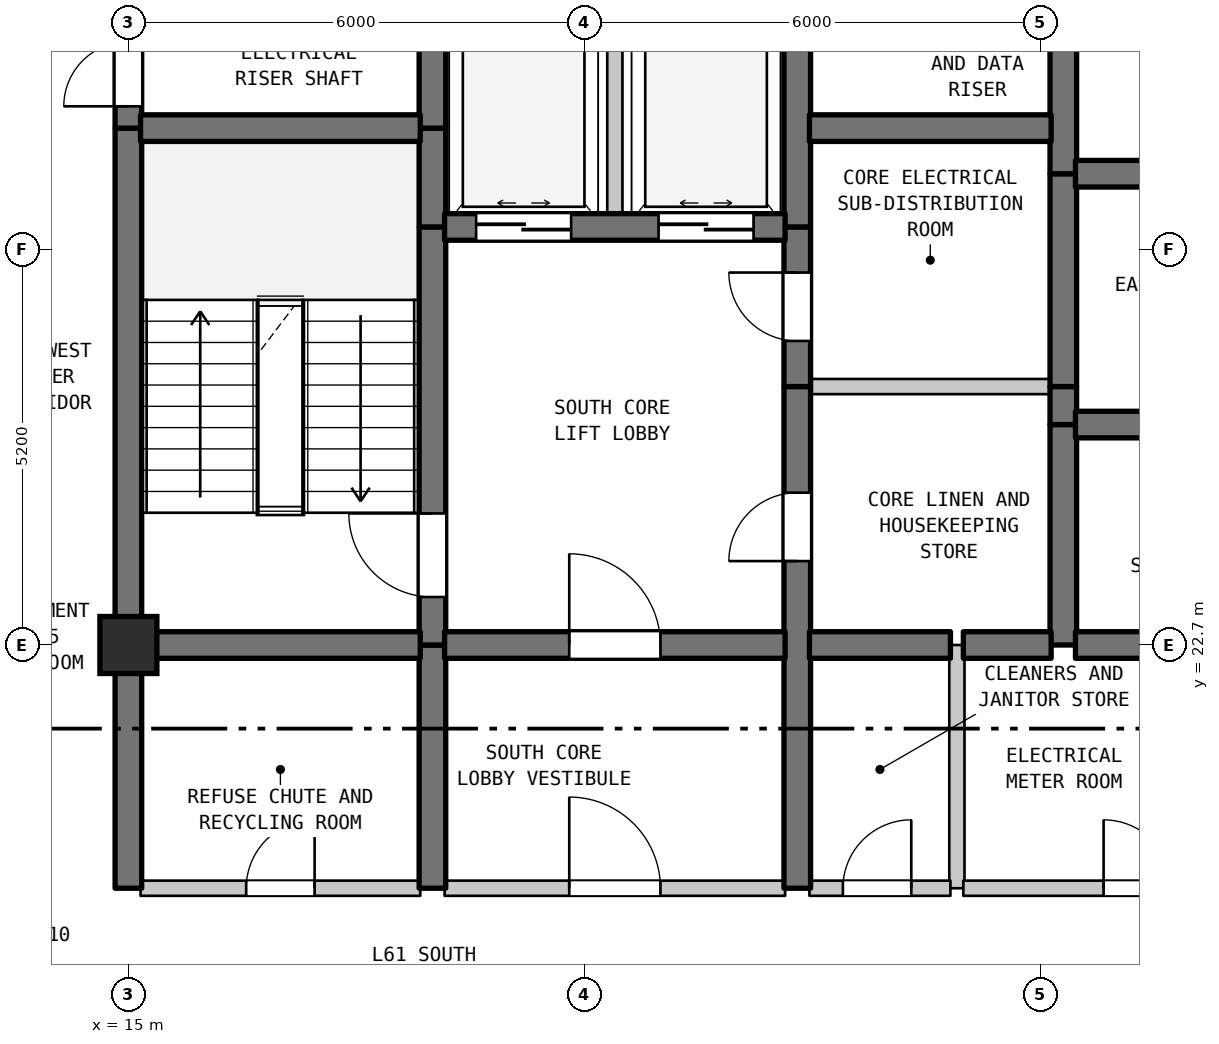
"""IFC4 building model, lengths in metres.
Left out: names, types, materials, properties, quantities, classifications, styles, units other than length and angle.
Written with IfcOpenShell. Run it as: python <this file> out.ifc"""

import sys

from ifc_helpers import new_model, si_unit, direction, frame, frame_2d, origin, origin_2d, place, context, subcontext, project, spatial, rectangle, extrude, element, fill, save


model = new_model("IFC4")
c1 = context("Model", 3, precision=1e-05, world=origin(), true_north=direction((0.0, 1.0)))
c2 = subcontext(c1, "Body", "Model", "MODEL_VIEW")
j1 = project(units=[si_unit("LENGTHUNIT", "METRE"), si_unit("PLANEANGLEUNIT", "RADIAN")], contexts=[c1])
p1 = place(None, origin())
s1 = spatial("IfcSite", under=j1, at=p1, CompositionType="ELEMENT")
p2 = place(p1, origin())
s2 = spatial("IfcBuilding", under=s1, at=p2, CompositionType="ELEMENT")
p3 = place(p2, frame((0.0, 0.0, 247.3)))
s3 = spatial("IfcBuildingStorey", under=s2, at=p3, CompositionType="ELEMENT", Elevation=247.3)
p4 = place(p3, frame((15.0, 22.7, 0.0), z_axis=(0.0, 0.0, 1.0), x_axis=(1.0, 0.0, 0.0)))
e1 = element("IfcColumn", 1, at=p4, inside=s3, PredefinedType="COLUMN", context=c2, shape_type="SweptSolid", body=[
    extrude(rectangle(XDim=0.75, YDim=0.75, at=origin_2d()), origin(), (0.0, 0.0, 1.0), 3.7),
])
p5 = place(p3, frame((15.0, 19.5, 0.0), z_axis=(0.0, 0.0, 1.0), x_axis=(0.0, 1.0, 0.0)))
e2 = element("IfcWall", 2, at=p5, inside=s3, PredefinedType="SHEAR", context=c2, shape_type="SweptSolid", body=[
    extrude(rectangle(XDim=3.2, YDim=0.35, at=frame_2d((1.6, 0.0))), origin(), (0.0, 0.0, 1.0), 3.39),
])
p6 = place(p3, frame((15.0, 22.7, 0.0), z_axis=(0.0, 0.0, 1.0), x_axis=(0.0, 1.0, 0.0)))
e3 = element("IfcWall", 3, at=p6, inside=s3, PredefinedType="SHEAR", context=c2, shape_type="SweptSolid", body=[
    extrude(rectangle(XDim=6.8, YDim=0.35, at=frame_2d((3.4, 0.0))), origin(), (0.0, 0.0, 1.0), 3.39),
])
p7 = place(p3, frame((15.0, 29.5, 0.0), z_axis=(0.0, 0.0, 1.0), x_axis=(0.0, 1.0, 0.0)))
e4 = element("IfcWall", 4, at=p7, inside=s3, PredefinedType="SHEAR", context=c2, shape_type="SweptSolid", body=[
    extrude(rectangle(XDim=1.6, YDim=0.35, at=frame_2d((0.8, 0.0))), origin(), (0.0, 0.0, 1.0), 3.39),
])
p8 = place(p7, frame((0.287, 0.0, 0.0)))
e5 = element("IfcOpeningElement", 5, at=p8, cuts=e4, PredefinedType="OPENING", context=c2, shape_type="SweptSolid", body=[
    extrude(rectangle(XDim=0.85, YDim=2.1, at=frame_2d((0.425, 1.05))), frame((0.0, 0.185, 0.0), z_axis=(0.0, -1.0, 0.0), x_axis=(1.0, 0.0, 0.0)), (0.0, 0.0, 1.0), 0.37),
])
p9 = place(p3, frame((19.0, 19.5, 0.0), z_axis=(0.0, 0.0, 1.0), x_axis=(0.0, 1.0, 0.0)))
e6 = element("IfcWall", 6, at=p9, inside=s3, PredefinedType="SHEAR", context=c2, shape_type="SweptSolid", body=[
    extrude(rectangle(XDim=3.2, YDim=0.35, at=frame_2d((1.6, 0.0))), origin(), (0.0, 0.0, 1.0), 3.39),
])
p10 = place(p3, frame((19.0, 22.7, 0.0), z_axis=(0.0, 0.0, 1.0), x_axis=(0.0, 1.0, 0.0)))
e7 = element("IfcWall", 7, at=p10, inside=s3, PredefinedType="SHEAR", context=c2, shape_type="SweptSolid", body=[
    extrude(rectangle(XDim=5.5, YDim=0.35, at=frame_2d((2.75, 0.0))), origin(), (0.0, 0.0, 1.0), 3.39),
])
p11 = place(p10, frame((0.631, 0.0, 0.0)))
e8 = element("IfcOpeningElement", 8, at=p11, cuts=e7, PredefinedType="OPENING", context=c2, shape_type="SweptSolid", body=[
    extrude(rectangle(XDim=1.1, YDim=2.15, at=frame_2d((0.55, 1.075))), frame((0.0, 0.185, 0.0), z_axis=(0.0, -1.0, 0.0), x_axis=(1.0, 0.0, 0.0)), (0.0, 0.0, 1.0), 0.37),
])
p12 = place(p3, frame((19.0, 28.2, 0.0), z_axis=(0.0, 0.0, 1.0), x_axis=(0.0, 1.0, 0.0)))
e9 = element("IfcWall", 9, at=p12, inside=s3, PredefinedType="SHEAR", context=c2, shape_type="SweptSolid", body=[
    extrude(rectangle(XDim=1.3, YDim=0.35, at=frame_2d((0.65, 0.0))), origin(), (0.0, 0.0, 1.0), 3.39),
])
p13 = place(p3, frame((19.0, 29.5, 0.0), z_axis=(0.0, 0.0, 1.0), x_axis=(0.0, 1.0, 0.0)))
e10 = element("IfcWall", 10, at=p13, inside=s3, PredefinedType="SHEAR", context=c2, shape_type="SweptSolid", body=[
    extrude(rectangle(XDim=5.5, YDim=0.35, at=frame_2d((2.75, 0.0))), origin(), (0.0, 0.0, 1.0), 3.39),
])
p14 = place(p13, frame((2.025, 0.0, 0.0)))
e11 = element("IfcOpeningElement", 11, at=p14, cuts=e10, PredefinedType="OPENING", context=c2, shape_type="SweptSolid", body=[
    extrude(rectangle(XDim=1.1, YDim=2.15, at=frame_2d((0.55, 1.075))), frame((0.0, 0.185, 0.0), z_axis=(0.0, -1.0, 0.0), x_axis=(1.0, 0.0, 0.0)), (0.0, 0.0, 1.0), 0.37),
])
p15 = place(p3, frame((21.4, 28.2, 0.0), z_axis=(0.0, 0.0, 1.0), x_axis=(0.0, 1.0, 0.0)))
e12 = element("IfcWall", 12, at=p15, inside=s3, PredefinedType="STANDARD", context=c2, shape_type="SweptSolid", body=[
    extrude(rectangle(XDim=2.6, YDim=0.2, at=frame_2d((1.3, 0.0))), origin(), (0.0, 0.0, 1.0), 3.39),
])
p16 = place(p3, frame((23.8, 19.5, 0.0), z_axis=(0.0, 0.0, 1.0), x_axis=(0.0, 1.0, 0.0)))
e13 = element("IfcWall", 13, at=p16, inside=s3, PredefinedType="SHEAR", context=c2, shape_type="SweptSolid", body=[
    extrude(rectangle(XDim=6.6, YDim=0.35, at=frame_2d((3.3, 0.0))), origin(), (0.0, 0.0, 1.0), 3.39),
])
p17 = place(p16, frame((4.304, 0.0, 0.0)))
e14 = element("IfcOpeningElement", 14, at=p17, cuts=e13, PredefinedType="OPENING", context=c2, shape_type="SweptSolid", body=[
    extrude(rectangle(XDim=0.9, YDim=2.15, at=frame_2d((0.45, 1.075))), frame((0.0, 0.185, 0.0), z_axis=(0.0, -1.0, 0.0), x_axis=(1.0, 0.0, 0.0)), (0.0, 0.0, 1.0), 0.37),
])
p18 = place(p3, frame((23.8, 26.1, 0.0), z_axis=(0.0, 0.0, 1.0), x_axis=(0.0, 1.0, 0.0)))
e15 = element("IfcWall", 15, at=p18, inside=s3, PredefinedType="SHEAR", context=c2, shape_type="SweptSolid", body=[
    extrude(rectangle(XDim=2.1, YDim=0.35, at=frame_2d((1.05, 0.0))), origin(), (0.0, 0.0, 1.0), 3.39),
])
p19 = place(p18, frame((0.6, 0.0, 0.0)))
e16 = element("IfcOpeningElement", 16, at=p19, cuts=e15, PredefinedType="OPENING", context=c2, shape_type="SweptSolid", body=[
    extrude(rectangle(XDim=0.9, YDim=2.15, at=frame_2d((0.45, 1.075))), frame((0.0, 0.185, 0.0), z_axis=(0.0, -1.0, 0.0), x_axis=(1.0, 0.0, 0.0)), (0.0, 0.0, 1.0), 0.37),
])
p20 = place(p3, frame((23.8, 28.2, 0.0), z_axis=(0.0, 0.0, 1.0), x_axis=(0.0, 1.0, 0.0)))
e17 = element("IfcWall", 17, at=p20, inside=s3, PredefinedType="SHEAR", context=c2, shape_type="SweptSolid", body=[
    extrude(rectangle(XDim=2.6, YDim=0.35, at=frame_2d((1.3, 0.0))), origin(), (0.0, 0.0, 1.0), 3.39),
])
p21 = place(p3, frame((25.9, 19.5, 0.0), z_axis=(0.0, 0.0, 1.0), x_axis=(0.0, 1.0, 0.0)))
e18 = element("IfcWall", 18, at=p21, inside=s3, PredefinedType="STANDARD", context=c2, shape_type="SweptSolid", body=[
    extrude(rectangle(XDim=3.2, YDim=0.2, at=frame_2d((1.6, 0.0))), origin(), (0.0, 0.0, 1.0), 3.39),
])
p22 = place(p3, frame((27.3, 22.7, 0.0), z_axis=(0.0, 0.0, 1.0), x_axis=(0.0, 1.0, 0.0)))
e19 = element("IfcWall", 19, at=p22, inside=s3, PredefinedType="SHEAR", context=c2, shape_type="SweptSolid", body=[
    extrude(rectangle(XDim=2.9, YDim=0.35, at=frame_2d((1.45, 0.0))), origin(), (0.0, 0.0, 1.0), 3.39),
])
p23 = place(p3, frame((27.3, 25.6, 0.0), z_axis=(0.0, 0.0, 1.0), x_axis=(0.0, 1.0, 0.0)))
e20 = element("IfcWall", 20, at=p23, inside=s3, PredefinedType="SHEAR", context=c2, shape_type="SweptSolid", body=[
    extrude(rectangle(XDim=0.5, YDim=0.35, at=frame_2d((0.25, 0.0))), origin(), (0.0, 0.0, 1.0), 3.39),
])
p24 = place(p3, frame((27.3, 26.1, 0.0), z_axis=(0.0, 0.0, 1.0), x_axis=(0.0, 1.0, 0.0)))
e21 = element("IfcWall", 21, at=p24, inside=s3, PredefinedType="SHEAR", context=c2, shape_type="SweptSolid", body=[
    extrude(rectangle(XDim=2.8, YDim=0.35, at=frame_2d((1.4, 0.0))), origin(), (0.0, 0.0, 1.0), 3.39),
])
p25 = place(p3, frame((27.3, 28.9, 0.0), z_axis=(0.0, 0.0, 1.0), x_axis=(0.0, 1.0, 0.0)))
e22 = element("IfcWall", 22, at=p25, inside=s3, PredefinedType="SHEAR", context=c2, shape_type="SweptSolid", body=[
    extrude(rectangle(XDim=2.6, YDim=0.35, at=frame_2d((1.3, 0.0))), origin(), (0.0, 0.0, 1.0), 3.39),
])
p26 = place(p3, frame((15.16, 19.5, 0.0), z_axis=(0.0, 0.0, 1.0), x_axis=(1.0, 0.0, 0.0)))
e23 = element("IfcWall", 23, at=p26, inside=s3, PredefinedType="STANDARD", context=c2, shape_type="SweptSolid", body=[
    extrude(rectangle(XDim=3.68, YDim=0.2, at=frame_2d((1.84, 0.0))), origin(), (0.0, 0.0, 1.0), 3.39),
])
p27 = place(p26, frame((1.39, 0.0, 0.0)))
e24 = element("IfcOpeningElement", 24, at=p27, cuts=e23, PredefinedType="OPENING", context=c2, shape_type="SweptSolid", body=[
    extrude(rectangle(XDim=0.9, YDim=2.15, at=frame_2d((0.45, 1.075))), frame((0.0, 0.11, 0.0), z_axis=(0.0, -1.0, 0.0), x_axis=(1.0, 0.0, 0.0)), (0.0, 0.0, 1.0), 0.22),
])
p28 = place(p3, frame((19.16, 19.5, 0.0), z_axis=(0.0, 0.0, 1.0), x_axis=(1.0, 0.0, 0.0)))
e25 = element("IfcWall", 25, at=p28, inside=s3, PredefinedType="STANDARD", context=c2, shape_type="SweptSolid", body=[
    extrude(rectangle(XDim=4.48, YDim=0.2, at=frame_2d((2.24, 0.0))), origin(), (0.0, 0.0, 1.0), 3.39),
])
p29 = place(p28, frame((1.64, 0.0, 0.0)))
e26 = element("IfcOpeningElement", 26, at=p29, cuts=e25, PredefinedType="OPENING", context=c2, shape_type="SweptSolid", body=[
    extrude(rectangle(XDim=1.2, YDim=2.2, at=frame_2d((0.6, 1.1))), frame((0.0, 0.11, 0.0), z_axis=(0.0, -1.0, 0.0), x_axis=(1.0, 0.0, 0.0)), (0.0, 0.0, 1.0), 0.22),
])
p30 = place(p3, frame((23.96, 19.5, 0.0), z_axis=(0.0, 0.0, 1.0), x_axis=(1.0, 0.0, 0.0)))
e27 = element("IfcWall", 27, at=p30, inside=s3, PredefinedType="STANDARD", context=c2, shape_type="SweptSolid", body=[
    extrude(rectangle(XDim=1.855, YDim=0.2, at=frame_2d((0.927, 0.0))), origin(), (0.0, 0.0, 1.0), 3.39),
])
p31 = place(p30, frame((0.44, 0.0, 0.0)))
e28 = element("IfcOpeningElement", 28, at=p31, cuts=e27, PredefinedType="OPENING", context=c2, shape_type="SweptSolid", body=[
    extrude(rectangle(XDim=0.9, YDim=2.15, at=frame_2d((0.45, 1.075))), frame((0.0, 0.11, 0.0), z_axis=(0.0, -1.0, 0.0), x_axis=(1.0, 0.0, 0.0)), (0.0, 0.0, 1.0), 0.22),
])
p32 = place(p3, frame((25.985, 19.5, 0.0), z_axis=(0.0, 0.0, 1.0), x_axis=(1.0, 0.0, 0.0)))
e29 = element("IfcWall", 29, at=p32, inside=s3, PredefinedType="STANDARD", context=c2, shape_type="SweptSolid", body=[
    extrude(rectangle(XDim=4.655, YDim=0.2, at=frame_2d((2.327, 0.0))), origin(), (0.0, 0.0, 1.0), 3.39),
])
p33 = place(p32, frame((1.845, 0.0, 0.0)))
e30 = element("IfcOpeningElement", 30, at=p33, cuts=e29, PredefinedType="OPENING", context=c2, shape_type="SweptSolid", body=[
    extrude(rectangle(XDim=0.9, YDim=2.15, at=frame_2d((0.45, 1.075))), frame((0.0, 0.11, 0.0), z_axis=(0.0, -1.0, 0.0), x_axis=(1.0, 0.0, 0.0)), (0.0, 0.0, 1.0), 0.22),
])
p34 = place(p3, frame((15.16, 22.7, 0.0), z_axis=(0.0, 0.0, 1.0), x_axis=(1.0, 0.0, 0.0)))
e31 = element("IfcWall", 31, at=p34, inside=s3, PredefinedType="SHEAR", context=c2, shape_type="SweptSolid", body=[
    extrude(rectangle(XDim=3.68, YDim=0.35, at=frame_2d((1.84, 0.0))), origin(), (0.0, 0.0, 1.0), 3.39),
])
p35 = place(p3, frame((19.16, 22.7, 0.0), z_axis=(0.0, 0.0, 1.0), x_axis=(1.0, 0.0, 0.0)))
e32 = element("IfcWall", 32, at=p35, inside=s3, PredefinedType="SHEAR", context=c2, shape_type="SweptSolid", body=[
    extrude(rectangle(XDim=4.48, YDim=0.35, at=frame_2d((2.24, 0.0))), origin(), (0.0, 0.0, 1.0), 3.39),
])
p36 = place(p35, frame((1.64, 0.0, 0.0)))
e33 = element("IfcOpeningElement", 33, at=p36, cuts=e32, PredefinedType="OPENING", context=c2, shape_type="SweptSolid", body=[
    extrude(rectangle(XDim=1.2, YDim=2.2, at=frame_2d((0.6, 1.1))), frame((0.0, 0.185, 0.0), z_axis=(0.0, -1.0, 0.0), x_axis=(1.0, 0.0, 0.0)), (0.0, 0.0, 1.0), 0.37),
])
p37 = place(p3, frame((23.96, 22.7, 0.0), z_axis=(0.0, 0.0, 1.0), x_axis=(1.0, 0.0, 0.0)))
e34 = element("IfcWall", 34, at=p37, inside=s3, PredefinedType="SHEAR", context=c2, shape_type="SweptSolid", body=[
    extrude(rectangle(XDim=1.855, YDim=0.35, at=frame_2d((0.927, 0.0))), origin(), (0.0, 0.0, 1.0), 3.39),
])
p38 = place(p3, frame((25.985, 22.7, 0.0), z_axis=(0.0, 0.0, 1.0), x_axis=(1.0, 0.0, 0.0)))
e35 = element("IfcWall", 35, at=p38, inside=s3, PredefinedType="SHEAR", context=c2, shape_type="SweptSolid", body=[
    extrude(rectangle(XDim=1.155, YDim=0.35, at=frame_2d((0.577, 0.0))), origin(), (0.0, 0.0, 1.0), 3.39),
])
p39 = place(p3, frame((27.46, 22.7, 0.0), z_axis=(0.0, 0.0, 1.0), x_axis=(1.0, 0.0, 0.0)))
e36 = element("IfcWall", 36, at=p39, inside=s3, PredefinedType="SHEAR", context=c2, shape_type="SweptSolid", body=[
    extrude(rectangle(XDim=3.18, YDim=0.35, at=frame_2d((1.59, 0.0))), origin(), (0.0, 0.0, 1.0), 3.39),
])
p40 = place(p3, frame((27.46, 25.6, 0.0), z_axis=(0.0, 0.0, 1.0), x_axis=(1.0, 0.0, 0.0)))
e37 = element("IfcWall", 37, at=p40, inside=s3, PredefinedType="SHEAR", context=c2, shape_type="SweptSolid", body=[
    extrude(rectangle(XDim=3.18, YDim=0.35, at=frame_2d((1.59, 0.0))), origin(), (0.0, 0.0, 1.0), 3.39),
])
p41 = place(p40, frame((1.115, 0.0, 0.0)))
e38 = element("IfcOpeningElement", 38, at=p41, cuts=e37, PredefinedType="OPENING", context=c2, shape_type="SweptSolid", body=[
    extrude(rectangle(XDim=0.95, YDim=2.15, at=frame_2d((0.475, 1.075))), frame((0.0, 0.185, 0.0), z_axis=(0.0, -1.0, 0.0), x_axis=(1.0, 0.0, 0.0)), (0.0, 0.0, 1.0), 0.37),
])
p42 = place(p3, frame((23.96, 26.1, 0.0), z_axis=(0.0, 0.0, 1.0), x_axis=(1.0, 0.0, 0.0)))
e39 = element("IfcWall", 39, at=p42, inside=s3, PredefinedType="STANDARD", context=c2, shape_type="SweptSolid", body=[
    extrude(rectangle(XDim=3.18, YDim=0.2, at=frame_2d((1.59, 0.0))), origin(), (0.0, 0.0, 1.0), 3.39),
])
p43 = place(p3, frame((19.16, 28.2, 0.0), z_axis=(0.0, 0.0, 1.0), x_axis=(1.0, 0.0, 0.0)))
e40 = element("IfcWall", 40, at=p43, inside=s3, PredefinedType="SHEAR", context=c2, shape_type="SweptSolid", body=[
    extrude(rectangle(XDim=4.48, YDim=0.35, at=frame_2d((2.24, 0.0))), origin(), (0.0, 0.0, 1.0), 3.39),
])
p44 = place(p43, frame((0.415, 0.0, 0.0)))
e41 = element("IfcOpeningElement", 41, at=p44, cuts=e40, PredefinedType="OPENING", context=c2, shape_type="SweptSolid", body=[
    extrude(rectangle(XDim=1.25, YDim=2.2, at=frame_2d((0.625, 1.1))), frame((0.0, 0.185, 0.0), z_axis=(0.0, -1.0, 0.0), x_axis=(1.0, 0.0, 0.0)), (0.0, 0.0, 1.0), 0.37),
])
p45 = place(p43, frame((2.815, 0.0, 0.0)))
e42 = element("IfcOpeningElement", 42, at=p45, cuts=e40, PredefinedType="OPENING", context=c2, shape_type="SweptSolid", body=[
    extrude(rectangle(XDim=1.25, YDim=2.2, at=frame_2d((0.625, 1.1))), frame((0.0, 0.185, 0.0), z_axis=(0.0, -1.0, 0.0), x_axis=(1.0, 0.0, 0.0)), (0.0, 0.0, 1.0), 0.37),
])
p46 = place(p3, frame((27.46, 28.9, 0.0), z_axis=(0.0, 0.0, 1.0), x_axis=(1.0, 0.0, 0.0)))
e43 = element("IfcWall", 43, at=p46, inside=s3, PredefinedType="SHEAR", context=c2, shape_type="SweptSolid", body=[
    extrude(rectangle(XDim=3.18, YDim=0.35, at=frame_2d((1.59, 0.0))), origin(), (0.0, 0.0, 1.0), 3.39),
])
p47 = place(p46, frame((1.115, 0.0, 0.0)))
e44 = element("IfcOpeningElement", 44, at=p47, cuts=e43, PredefinedType="OPENING", context=c2, shape_type="SweptSolid", body=[
    extrude(rectangle(XDim=0.95, YDim=2.15, at=frame_2d((0.475, 1.075))), frame((0.0, 0.185, 0.0), z_axis=(0.0, -1.0, 0.0), x_axis=(1.0, 0.0, 0.0)), (0.0, 0.0, 1.0), 0.37),
])
p48 = place(p3, frame((15.16, 29.5, 0.0), z_axis=(0.0, 0.0, 1.0), x_axis=(1.0, 0.0, 0.0)))
e45 = element("IfcWall", 45, at=p48, inside=s3, PredefinedType="SHEAR", context=c2, shape_type="SweptSolid", body=[
    extrude(rectangle(XDim=3.68, YDim=0.35, at=frame_2d((1.84, 0.0))), origin(), (0.0, 0.0, 1.0), 3.39),
])
p49 = place(p3, frame((23.96, 29.5, 0.0), z_axis=(0.0, 0.0, 1.0), x_axis=(1.0, 0.0, 0.0)))
e46 = element("IfcWall", 46, at=p49, inside=s3, PredefinedType="SHEAR", context=c2, shape_type="SweptSolid", body=[
    extrude(rectangle(XDim=3.18, YDim=0.35, at=frame_2d((1.59, 0.0))), origin(), (0.0, 0.0, 1.0), 3.39),
])
p50 = place(p8, origin())
e47 = element("IfcDoor", 47, at=p50, inside=s3, OperationType="SINGLE_SWING_LEFT", PredefinedType="DOOR", context=c2, shape_type="SweptSolid", body=[
    extrude(rectangle(XDim=0.85, YDim=2.1, at=frame_2d((0.425, 1.05))), frame((0.0, 0.025, 0.0), z_axis=(0.0, -1.0, 0.0), x_axis=(1.0, 0.0, 0.0)), (0.0, 0.0, 1.0), 0.05),
])
fill(e5, e47)
p51 = place(p11, origin())
e48 = element("IfcDoor", 48, at=p51, inside=s3, OperationType="SINGLE_SWING_RIGHT", PredefinedType="DOOR", context=c2, shape_type="SweptSolid", body=[
    extrude(rectangle(XDim=1.1, YDim=2.15, at=frame_2d((0.55, 1.075))), frame((0.0, 0.025, 0.0), z_axis=(0.0, -1.0, 0.0), x_axis=(1.0, 0.0, 0.0)), (0.0, 0.0, 1.0), 0.05),
])
fill(e8, e48)
p52 = place(p17, origin())
e49 = element("IfcDoor", 49, at=p52, inside=s3, OperationType="SINGLE_SWING_LEFT", PredefinedType="DOOR", context=c2, shape_type="SweptSolid", body=[
    extrude(rectangle(XDim=0.9, YDim=2.15, at=frame_2d((0.45, 1.075))), frame((0.0, 0.025, 0.0), z_axis=(0.0, -1.0, 0.0), x_axis=(1.0, 0.0, 0.0)), (0.0, 0.0, 1.0), 0.05),
])
fill(e14, e49)
p53 = place(p19, origin())
e50 = element("IfcDoor", 50, at=p53, inside=s3, OperationType="SINGLE_SWING_RIGHT", PredefinedType="DOOR", context=c2, shape_type="SweptSolid", body=[
    extrude(rectangle(XDim=0.9, YDim=2.15, at=frame_2d((0.45, 1.075))), frame((0.0, 0.025, 0.0), z_axis=(0.0, -1.0, 0.0), x_axis=(1.0, 0.0, 0.0)), (0.0, 0.0, 1.0), 0.05),
])
fill(e16, e50)
p54 = place(p27, origin())
e51 = element("IfcDoor", 51, at=p54, inside=s3, OperationType="SINGLE_SWING_RIGHT", PredefinedType="DOOR", context=c2, shape_type="SweptSolid", body=[
    extrude(rectangle(XDim=0.9, YDim=2.15, at=frame_2d((0.45, 1.075))), frame((0.0, 0.025, 0.0), z_axis=(0.0, -1.0, 0.0), x_axis=(1.0, 0.0, 0.0)), (0.0, 0.0, 1.0), 0.05),
])
fill(e24, e51)
p55 = place(p29, origin())
e52 = element("IfcDoor", 52, at=p55, inside=s3, OperationType="SINGLE_SWING_LEFT", PredefinedType="DOOR", context=c2, shape_type="SweptSolid", body=[
    extrude(rectangle(XDim=1.2, YDim=2.2, at=frame_2d((0.6, 1.1))), frame((0.0, 0.025, 0.0), z_axis=(0.0, -1.0, 0.0), x_axis=(1.0, 0.0, 0.0)), (0.0, 0.0, 1.0), 0.05),
])
fill(e26, e52)
p56 = place(p31, origin())
e53 = element("IfcDoor", 53, at=p56, inside=s3, OperationType="SINGLE_SWING_RIGHT", PredefinedType="DOOR", context=c2, shape_type="SweptSolid", body=[
    extrude(rectangle(XDim=0.9, YDim=2.15, at=frame_2d((0.45, 1.075))), frame((0.0, 0.025, 0.0), z_axis=(0.0, -1.0, 0.0), x_axis=(1.0, 0.0, 0.0)), (0.0, 0.0, 1.0), 0.05),
])
fill(e28, e53)
p57 = place(p33, origin())
e54 = element("IfcDoor", 54, at=p57, inside=s3, OperationType="SINGLE_SWING_LEFT", PredefinedType="DOOR", context=c2, shape_type="SweptSolid", body=[
    extrude(rectangle(XDim=0.9, YDim=2.15, at=frame_2d((0.45, 1.075))), frame((0.0, 0.025, 0.0), z_axis=(0.0, -1.0, 0.0), x_axis=(1.0, 0.0, 0.0)), (0.0, 0.0, 1.0), 0.05),
])
fill(e30, e54)
p58 = place(p36, origin())
e55 = element("IfcDoor", 55, at=p58, inside=s3, OperationType="SINGLE_SWING_LEFT", PredefinedType="DOOR", context=c2, shape_type="SweptSolid", body=[
    extrude(rectangle(XDim=1.2, YDim=2.2, at=frame_2d((0.6, 1.1))), frame((0.0, 0.025, 0.0), z_axis=(0.0, -1.0, 0.0), x_axis=(1.0, 0.0, 0.0)), (0.0, 0.0, 1.0), 0.05),
])
fill(e33, e55)
p59 = place(p44, origin())
e56 = element("IfcDoor", 56, at=p59, inside=s3, OperationType="DOUBLE_DOOR_SLIDING", PredefinedType="DOOR", context=c2, shape_type="SweptSolid", body=[
    extrude(rectangle(XDim=1.25, YDim=2.2, at=frame_2d((0.625, 1.1))), frame((0.0, 0.025, 0.0), z_axis=(0.0, -1.0, 0.0), x_axis=(1.0, 0.0, 0.0)), (0.0, 0.0, 1.0), 0.05),
])
fill(e41, e56)
p60 = place(p45, origin())
e57 = element("IfcDoor", 57, at=p60, inside=s3, OperationType="DOUBLE_DOOR_SLIDING", PredefinedType="DOOR", context=c2, shape_type="SweptSolid", body=[
    extrude(rectangle(XDim=1.25, YDim=2.2, at=frame_2d((0.625, 1.1))), frame((0.0, 0.025, 0.0), z_axis=(0.0, -1.0, 0.0), x_axis=(1.0, 0.0, 0.0)), (0.0, 0.0, 1.0), 0.05),
])
fill(e42, e57)
save(model, sys.argv[1])
